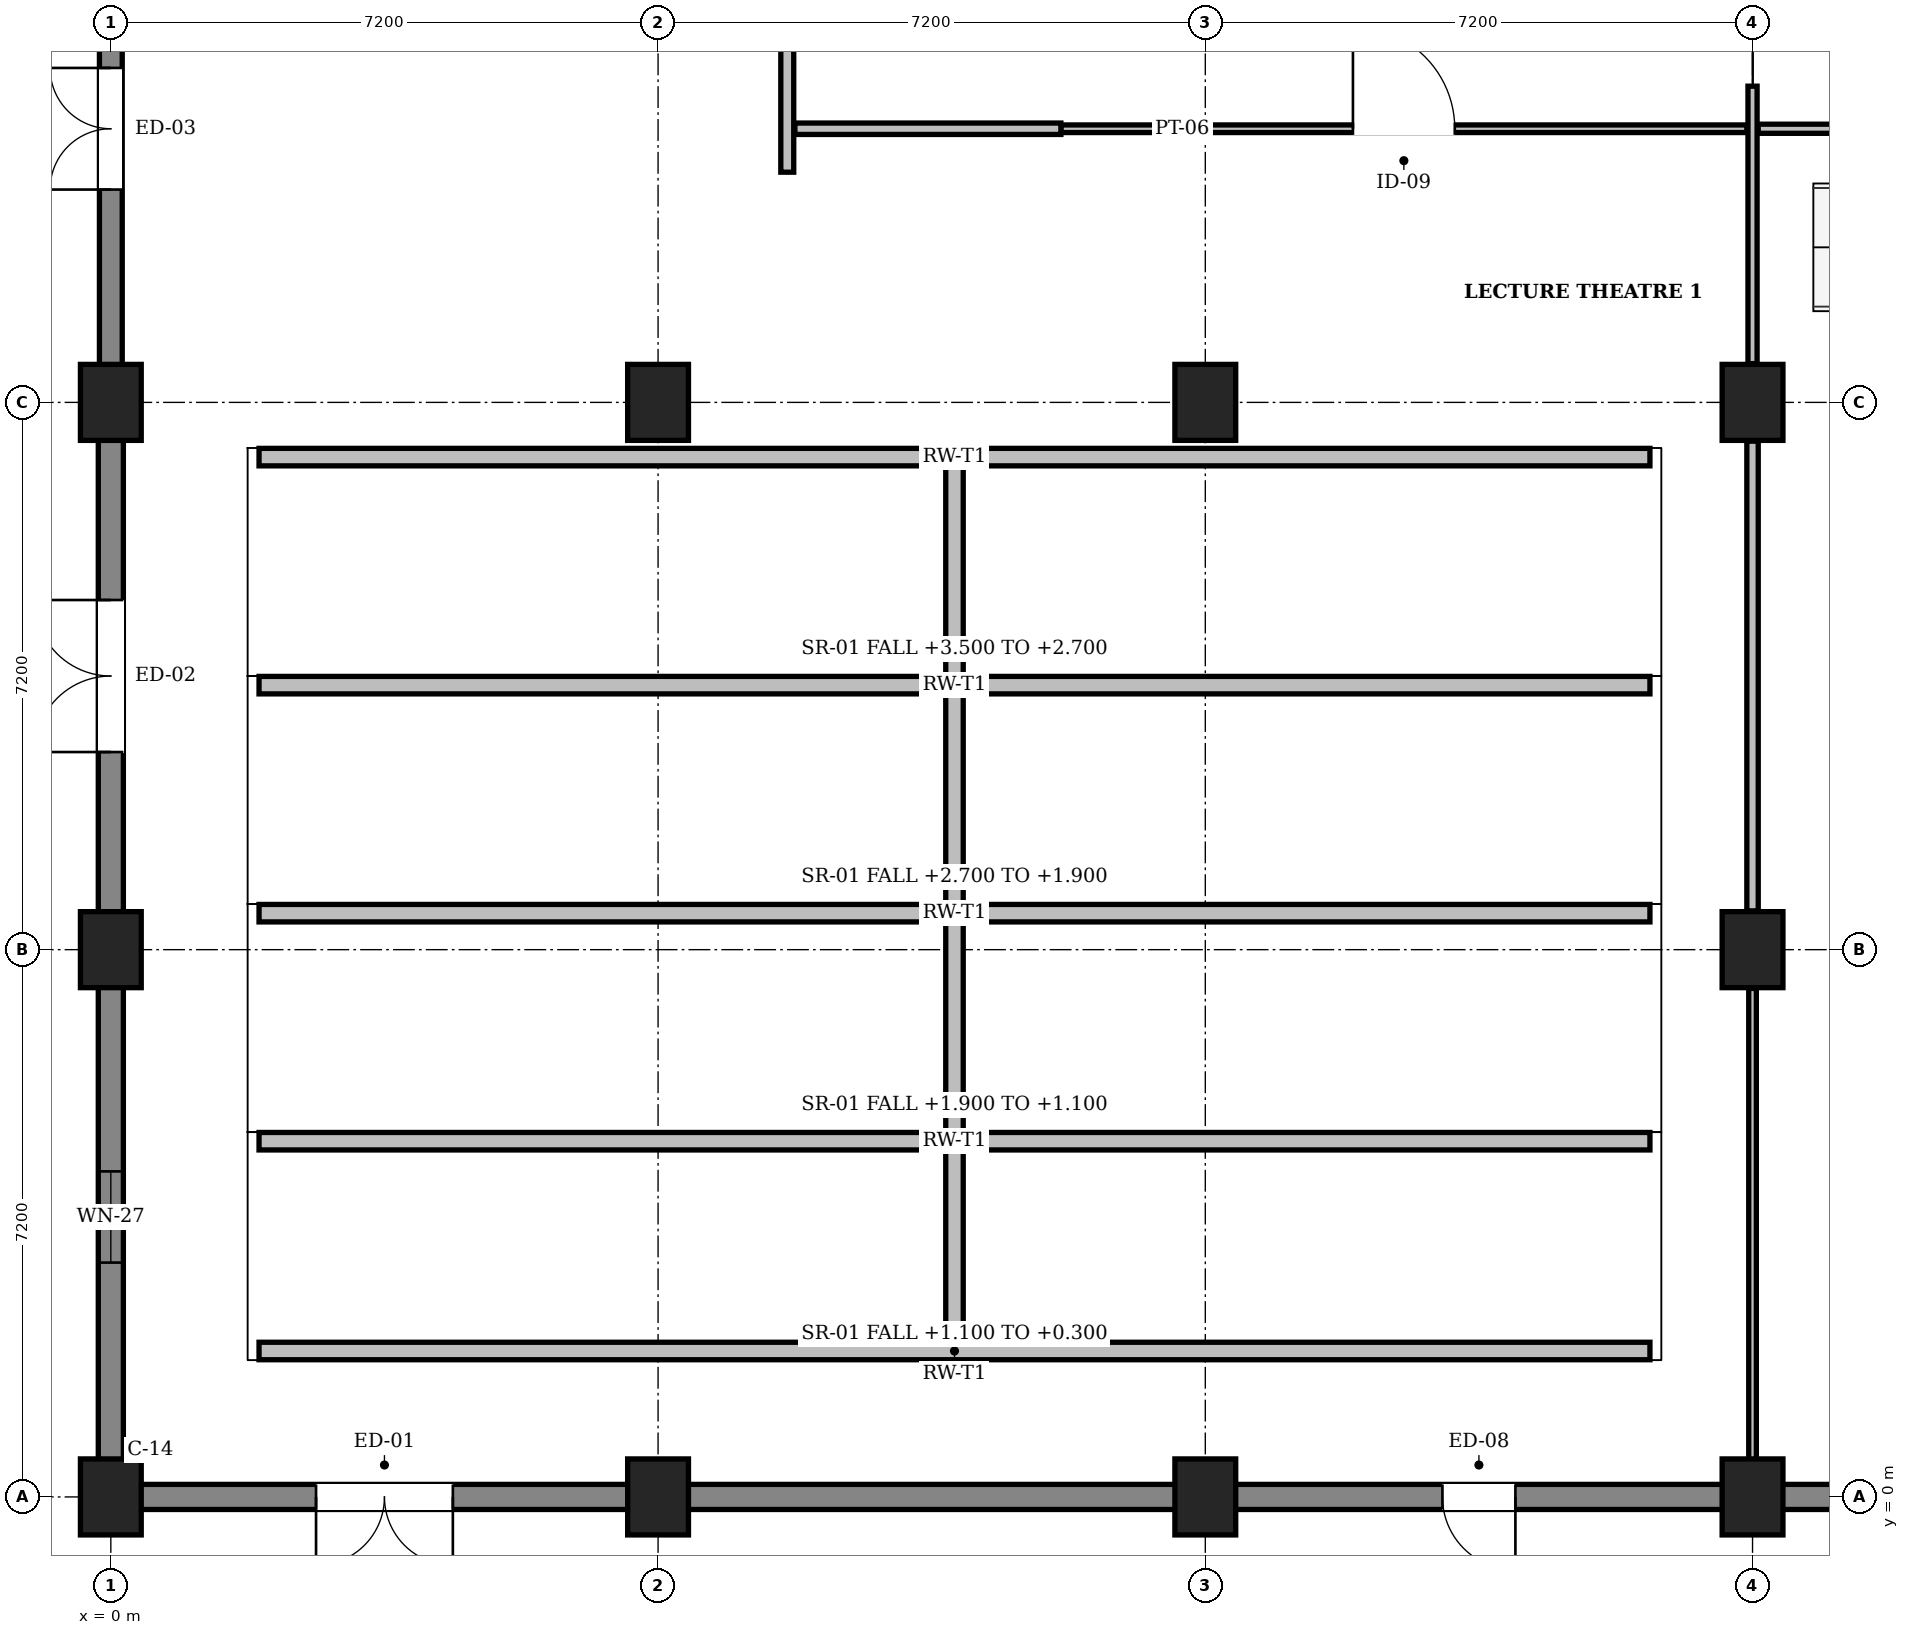
"""IFC4 building model, lengths in metres.
Left out: names, types, materials, properties, quantities, classifications, styles, units other than length and angle.
Written with IfcOpenShell. Run it as: python <this file> out.ifc"""

import sys

from ifc_helpers import new_model, si_unit, direction, frame, frame_2d, origin, origin_2d, place, context, subcontext, project, spatial, rectangle, extrude, element, fill, save


model = new_model("IFC4")
c1 = context("Model", 3, precision=1e-05, world=origin(), true_north=direction((0.0, 1.0)))
c2 = subcontext(c1, "Body", "Model", "MODEL_VIEW")
j1 = project(units=[si_unit("LENGTHUNIT", "METRE"), si_unit("PLANEANGLEUNIT", "RADIAN")], contexts=[c1])
p1 = place(None, origin())
s1 = spatial("IfcSite", under=j1, at=p1, CompositionType="ELEMENT")
p2 = place(p1, origin())
s2 = spatial("IfcBuilding", under=s1, at=p2, CompositionType="ELEMENT")
p3 = place(p2, origin())
s3 = spatial("IfcBuildingStorey", under=s2, at=p3, CompositionType="ELEMENT", Elevation=0.0)
for number, where, z_axis, x_axis in (
    (1, (0.0, 0.0, 0.0), (0.0, 0.0, 1.0), (1.0, 0.0, 0.0)),
    (2, (0.0, 7.2, 0.0), (0.0, 0.0, 1.0), (1.0, 0.0, 0.0)),
    (3, (0.0, 14.4, 0.0), (0.0, 0.0, 1.0), (1.0, 0.0, 0.0)),
    (4, (7.2, 0.0, 0.0), (0.0, 0.0, 1.0), (1.0, 0.0, 0.0)),
    (5, (7.2, 14.4, 0.0), (0.0, 0.0, 1.0), (1.0, 0.0, 0.0)),
    (6, (14.4, 0.0, 0.0), (0.0, 0.0, 1.0), (1.0, 0.0, 0.0)),
    (7, (14.4, 14.4, 0.0), (0.0, 0.0, 1.0), (1.0, 0.0, 0.0)),
    (8, (21.6, 0.0, 0.0), (0.0, 0.0, 1.0), (1.0, 0.0, 0.0)),
    (9, (21.6, 7.2, 0.0), (0.0, 0.0, 1.0), (1.0, 0.0, 0.0)),
    (10, (21.6, 14.4, 0.0), (0.0, 0.0, 1.0), (1.0, 0.0, 0.0)),
):
    element("IfcColumn", number, at=place(p3, frame(where, z_axis=z_axis, x_axis=x_axis)), inside=s3, PredefinedType="COLUMN", context=c2, shape_type="SweptSolid", body=[
        extrude(rectangle(XDim=0.8, YDim=1.0, at=origin_2d()), origin(), (0.0, 0.0, 1.0), 4.8),
    ])
p4 = place(p3, frame((1.95, 1.92, 0.0), z_axis=(0.0, 0.0, 1.0), x_axis=(1.0, 0.0, 0.0)))
e11 = element("IfcWall", 11, at=p4, inside=s3, PredefinedType="SOLIDWALL", context=c2, shape_type="SweptSolid", body=[
    extrude(rectangle(XDim=18.3, YDim=0.23, at=frame_2d((9.15, 0.0))), origin(), (0.0, 0.0, 1.0), 0.1),
])
p5 = place(p3, frame((1.95, 4.68, 0.0), z_axis=(0.0, 0.0, 1.0), x_axis=(1.0, 0.0, 0.0)))
e12 = element("IfcWall", 12, at=p5, inside=s3, PredefinedType="SOLIDWALL", context=c2, shape_type="SweptSolid", body=[
    extrude(rectangle(XDim=18.3, YDim=0.23, at=frame_2d((9.15, 0.0))), origin(), (0.0, 0.0, 1.0), 0.88),
])
p6 = place(p3, frame((11.1, 2.035, 0.0), z_axis=(0.0, 0.0, 1.0), x_axis=(0.0, 1.0, 0.0)))
e13 = element("IfcWall", 13, at=p6, inside=s3, PredefinedType="SOLIDWALL", context=c2, shape_type="SweptSolid", body=[
    extrude(rectangle(XDim=2.53, YDim=0.23, at=frame_2d((1.265, 0.0))), origin(), (0.0, 0.0, 1.0), 0.48),
])
p7 = place(p3, frame((1.95, 7.68, 0.0), z_axis=(0.0, 0.0, 1.0), x_axis=(1.0, 0.0, 0.0)))
e14 = element("IfcWall", 14, at=p7, inside=s3, PredefinedType="SOLIDWALL", context=c2, shape_type="SweptSolid", body=[
    extrude(rectangle(XDim=18.3, YDim=0.23, at=frame_2d((9.15, 0.0))), origin(), (0.0, 0.0, 1.0), 1.68),
])
p8 = place(p3, frame((11.1, 4.795, 0.0), z_axis=(0.0, 0.0, 1.0), x_axis=(0.0, 1.0, 0.0)))
e15 = element("IfcWall", 15, at=p8, inside=s3, PredefinedType="SOLIDWALL", context=c2, shape_type="SweptSolid", body=[
    extrude(rectangle(XDim=2.77, YDim=0.23, at=frame_2d((1.385, 0.0))), origin(), (0.0, 0.0, 1.0), 1.28),
])
p9 = place(p3, frame((1.95, 10.68, 0.0), z_axis=(0.0, 0.0, 1.0), x_axis=(1.0, 0.0, 0.0)))
e16 = element("IfcWall", 16, at=p9, inside=s3, PredefinedType="SOLIDWALL", context=c2, shape_type="SweptSolid", body=[
    extrude(rectangle(XDim=18.3, YDim=0.23, at=frame_2d((9.15, 0.0))), origin(), (0.0, 0.0, 1.0), 2.48),
])
p10 = place(p3, frame((11.1, 7.795, 0.0), z_axis=(0.0, 0.0, 1.0), x_axis=(0.0, 1.0, 0.0)))
e17 = element("IfcWall", 17, at=p10, inside=s3, PredefinedType="SOLIDWALL", context=c2, shape_type="SweptSolid", body=[
    extrude(rectangle(XDim=2.77, YDim=0.23, at=frame_2d((1.385, 0.0))), origin(), (0.0, 0.0, 1.0), 2.08),
])
p11 = place(p3, frame((1.95, 13.68, 0.0), z_axis=(0.0, 0.0, 1.0), x_axis=(1.0, 0.0, 0.0)))
e18 = element("IfcWall", 18, at=p11, inside=s3, PredefinedType="SOLIDWALL", context=c2, shape_type="SweptSolid", body=[
    extrude(rectangle(XDim=18.3, YDim=0.23, at=frame_2d((9.15, 0.0))), origin(), (0.0, 0.0, 1.0), 3.28),
])
p12 = place(p3, frame((11.1, 10.795, 0.0), z_axis=(0.0, 0.0, 1.0), x_axis=(0.0, 1.0, 0.0)))
e19 = element("IfcWall", 19, at=p12, inside=s3, PredefinedType="SOLIDWALL", context=c2, shape_type="SweptSolid", body=[
    extrude(rectangle(XDim=2.77, YDim=0.23, at=frame_2d((1.385, 0.0))), origin(), (0.0, 0.0, 1.0), 2.88),
])
p13 = place(p3, frame((28.8, 0.0, 0.0), z_axis=(0.0, 0.0, 1.0), x_axis=(-1.0, 0.0, 0.0)))
e20 = element("IfcWall", 20, at=p13, inside=s3, PredefinedType="SOLIDWALL", context=c2, shape_type="SweptSolid", body=[
    extrude(rectangle(XDim=7.2, YDim=0.33, at=frame_2d((3.6, 0.0))), origin(), (0.0, 0.0, 1.0), 4.52),
])
p14 = place(p3, frame((21.6, 0.0, 0.0), z_axis=(0.0, 0.0, 1.0), x_axis=(-1.0, 0.0, 0.0)))
e21 = element("IfcWall", 21, at=p14, inside=s3, PredefinedType="SOLIDWALL", context=c2, shape_type="SweptSolid", body=[
    extrude(rectangle(XDim=7.2, YDim=0.33, at=frame_2d((3.6, 0.0))), origin(), (0.0, 0.0, 1.0), 4.52),
])
p15 = place(p14, frame((3.12, 0.0, 0.0)))
e22 = element("IfcOpeningElement", 22, at=p15, cuts=e21, PredefinedType="OPENING", context=c2, shape_type="SweptSolid", body=[
    extrude(rectangle(XDim=0.96, YDim=2.1, at=frame_2d((0.48, 1.05))), frame((0.0, 0.177, 0.0), z_axis=(0.0, -1.0, 0.0), x_axis=(1.0, 0.0, 0.0)), (0.0, 0.0, 1.0), 0.354),
])
p16 = place(p3, frame((14.4, 0.0, 0.0), z_axis=(0.0, 0.0, 1.0), x_axis=(-1.0, 0.0, 0.0)))
e23 = element("IfcWall", 23, at=p16, inside=s3, PredefinedType="SOLIDWALL", context=c2, shape_type="SweptSolid", body=[
    extrude(rectangle(XDim=7.2, YDim=0.33, at=frame_2d((3.6, 0.0))), origin(), (0.0, 0.0, 1.0), 4.52),
])
p17 = place(p3, frame((7.2, 0.0, 0.0), z_axis=(0.0, 0.0, 1.0), x_axis=(-1.0, 0.0, 0.0)))
e24 = element("IfcWall", 24, at=p17, inside=s3, PredefinedType="SOLIDWALL", context=c2, shape_type="SweptSolid", body=[
    extrude(rectangle(XDim=7.35, YDim=0.33, at=frame_2d((3.675, 0.0))), origin(), (0.0, 0.0, 1.0), 4.52),
])
p18 = place(p17, frame((2.7, 0.0, 0.0)))
e25 = element("IfcOpeningElement", 25, at=p18, cuts=e24, PredefinedType="OPENING", context=c2, shape_type="SweptSolid", body=[
    extrude(rectangle(XDim=1.8, YDim=2.2, at=frame_2d((0.9, 1.1))), frame((0.0, 0.177, 0.0), z_axis=(0.0, -1.0, 0.0), x_axis=(1.0, 0.0, 0.0)), (0.0, 0.0, 1.0), 0.354),
])
p19 = place(p3, frame((0.0, 0.166, 0.0), z_axis=(0.0, 0.0, 1.0), x_axis=(0.0, 1.0, 0.0)))
e26 = element("IfcWall", 26, at=p19, inside=s3, PredefinedType="SOLIDWALL", context=c2, shape_type="SweptSolid", body=[
    extrude(rectangle(XDim=7.034, YDim=0.33, at=frame_2d((3.517, 0.0))), origin(), (0.0, 0.0, 1.0), 4.52),
])
p20 = place(p19, frame((2.917, 0.0, 0.95)))
e27 = element("IfcOpeningElement", 27, at=p20, cuts=e26, PredefinedType="OPENING", context=c2, shape_type="SweptSolid", body=[
    extrude(rectangle(XDim=1.2, YDim=1.8, at=frame_2d((0.6, 0.9))), frame((0.0, 0.177, 0.0), z_axis=(0.0, -1.0, 0.0), x_axis=(1.0, 0.0, 0.0)), (0.0, 0.0, 1.0), 0.354),
])
p21 = place(p3, frame((0.0, 7.2, 0.0), z_axis=(0.0, 0.0, 1.0), x_axis=(0.0, 1.0, 0.0)))
e28 = element("IfcWall", 28, at=p21, inside=s3, PredefinedType="SOLIDWALL", context=c2, shape_type="SweptSolid", body=[
    extrude(rectangle(XDim=7.2, YDim=0.33, at=frame_2d((3.6, 0.0))), origin(), (0.0, 0.0, 1.0), 4.52),
])
p22 = place(p21, frame((2.6, 0.0, 0.0)))
e29 = element("IfcOpeningElement", 29, at=p22, cuts=e28, PredefinedType="OPENING", context=c2, shape_type="SweptSolid", body=[
    extrude(rectangle(XDim=2.0, YDim=2.3, at=frame_2d((1.0, 1.15))), frame((0.0, 0.177, 0.0), z_axis=(0.0, -1.0, 0.0), x_axis=(1.0, 0.0, 0.0)), (0.0, 0.0, 1.0), 0.354),
])
p23 = place(p3, frame((0.0, 14.4, 0.0), z_axis=(0.0, 0.0, 1.0), x_axis=(0.0, 1.0, 0.0)))
e30 = element("IfcWall", 30, at=p23, inside=s3, PredefinedType="SOLIDWALL", context=c2, shape_type="SweptSolid", body=[
    extrude(rectangle(XDim=7.2, YDim=0.3, at=frame_2d((3.6, 0.0))), origin(), (0.0, 0.0, 1.0), 4.52),
])
p24 = place(p23, frame((2.8, 0.0, 0.0)))
e31 = element("IfcOpeningElement", 31, at=p24, cuts=e30, PredefinedType="OPENING", context=c2, shape_type="SweptSolid", body=[
    extrude(rectangle(XDim=1.6, YDim=2.2, at=frame_2d((0.8, 1.1))), frame((0.0, 0.162, 0.0), z_axis=(0.0, -1.0, 0.0), x_axis=(1.0, 0.0, 0.0)), (0.0, 0.0, 1.0), 0.324),
])
p25 = place(p3, frame((8.9, 17.428, 0.0), z_axis=(0.0, 0.0, 1.0), x_axis=(0.0, 1.0, 0.0)))
e32 = element("IfcWall", 32, at=p25, inside=s3, PredefinedType="PARTITIONING", context=c2, shape_type="SweptSolid", body=[
    extrude(rectangle(XDim=2.072, YDim=0.17, at=frame_2d((1.036, 0.0))), origin(), (0.0, 0.0, 1.0), 4.46),
])
p26 = place(p3, frame((21.6, 0.177, 0.0), z_axis=(0.0, 0.0, 1.0), x_axis=(0.0, 1.0, 0.0)))
e33 = element("IfcWall", 33, at=p26, inside=s3, PredefinedType="PARTITIONING", context=c2, shape_type="SweptSolid", body=[
    extrude(rectangle(XDim=6.513, YDim=0.1, at=frame_2d((3.256, 0.0))), origin(), (0.0, 0.0, 1.0), 4.08),
])
p27 = place(p3, frame((21.6, 7.71, 0.0), z_axis=(0.0, 0.0, 1.0), x_axis=(0.0, 1.0, 0.0)))
e34 = element("IfcWall", 34, at=p27, inside=s3, PredefinedType="PARTITIONING", context=c2, shape_type="SweptSolid", body=[
    extrude(rectangle(XDim=6.18, YDim=0.15, at=frame_2d((3.09, 0.0))), origin(), (0.0, 0.0, 1.0), 4.08),
])
p28 = place(p3, frame((21.6, 14.91, 0.0), z_axis=(0.0, 0.0, 1.0), x_axis=(0.0, 1.0, 0.0)))
e35 = element("IfcWall", 35, at=p28, inside=s3, PredefinedType="PARTITIONING", context=c2, shape_type="SweptSolid", body=[
    extrude(rectangle(XDim=3.65, YDim=0.12, at=frame_2d((1.825, 0.0))), origin(), (0.0, 0.0, 1.0), 4.08),
])
p29 = place(p3, frame((12.5, 18.0, 0.0), z_axis=(0.0, 0.0, 1.0), x_axis=(1.0, 0.0, 0.0)))
e36 = element("IfcWall", 36, at=p29, inside=s3, PredefinedType="PARTITIONING", context=c2, shape_type="SweptSolid", body=[
    extrude(rectangle(XDim=9.025, YDim=0.1, at=frame_2d((4.512, 0.0))), origin(), (0.0, 0.0, 1.0), 4.46),
])
p30 = place(p29, frame((3.843, 0.0, 0.0)))
e37 = element("IfcOpeningElement", 37, at=p30, cuts=e36, PredefinedType="OPENING", context=c2, shape_type="SweptSolid", body=[
    extrude(rectangle(XDim=1.34, YDim=2.24, at=frame_2d((0.67, 1.12))), frame((0.0, 0.062, 0.0), z_axis=(0.0, -1.0, 0.0), x_axis=(1.0, 0.0, 0.0)), (0.0, 0.0, 1.0), 0.124),
])
p31 = place(p3, frame((9.0, 18.0, 0.0), z_axis=(0.0, 0.0, 1.0), x_axis=(1.0, 0.0, 0.0)))
e38 = element("IfcWall", 38, at=p31, inside=s3, PredefinedType="PARTITIONING", context=c2, shape_type="SweptSolid", body=[
    extrude(rectangle(XDim=3.5, YDim=0.15, at=frame_2d((1.75, 0.0))), origin(), (0.0, 0.0, 1.0), 4.46),
])
p32 = place(p3, frame((21.675, 18.0, 0.0), z_axis=(0.0, 0.0, 1.0), x_axis=(1.0, 0.0, 0.0)))
e39 = element("IfcWall", 39, at=p32, inside=s3, PredefinedType="PARTITIONING", context=c2, shape_type="SweptSolid", body=[
    extrude(rectangle(XDim=22.085, YDim=0.12, at=frame_2d((11.042, 0.0))), origin(), (0.0, 0.0, 1.0), 4.46),
])
p33 = place(p15, origin())
e40 = element("IfcDoor", 40, at=p33, inside=s3, OperationType="SINGLE_SWING_LEFT", PredefinedType="DOOR", context=c2, shape_type="SweptSolid", body=[
    extrude(rectangle(XDim=0.96, YDim=2.1, at=frame_2d((0.48, 1.05))), frame((0.0, 0.025, 0.0), z_axis=(0.0, -1.0, 0.0), x_axis=(1.0, 0.0, 0.0)), (0.0, 0.0, 1.0), 0.05),
])
fill(e22, e40)
p34 = place(p18, origin())
e41 = element("IfcDoor", 41, at=p34, inside=s3, OperationType="DOUBLE_DOOR_SINGLE_SWING", PredefinedType="DOOR", context=c2, shape_type="SweptSolid", body=[
    extrude(rectangle(XDim=1.8, YDim=2.2, at=frame_2d((0.9, 1.1))), frame((0.0, 0.025, 0.0), z_axis=(0.0, -1.0, 0.0), x_axis=(1.0, 0.0, 0.0)), (0.0, 0.0, 1.0), 0.05),
])
fill(e25, e41)
p35 = place(p20, origin())
e42 = element("IfcWindow", 42, at=p35, inside=s3, PartitioningType="SINGLE_PANEL", PredefinedType="WINDOW", context=c2, shape_type="SweptSolid", body=[
    extrude(rectangle(XDim=1.2, YDim=1.8, at=frame_2d((0.6, 0.9))), frame((0.0, 0.03, 0.0), z_axis=(0.0, -1.0, 0.0), x_axis=(1.0, 0.0, 0.0)), (0.0, 0.0, 1.0), 0.06),
])
fill(e27, e42)
p36 = place(p22, origin())
e43 = element("IfcDoor", 43, at=p36, inside=s3, OperationType="DOUBLE_DOOR_SINGLE_SWING", PredefinedType="DOOR", context=c2, shape_type="SweptSolid", body=[
    extrude(rectangle(XDim=2.0, YDim=2.3, at=frame_2d((1.0, 1.15))), frame((0.0, 0.025, 0.0), z_axis=(0.0, -1.0, 0.0), x_axis=(1.0, 0.0, 0.0)), (0.0, 0.0, 1.0), 0.05),
])
fill(e29, e43)
p37 = place(p24, origin())
e44 = element("IfcDoor", 44, at=p37, inside=s3, OperationType="DOUBLE_DOOR_SINGLE_SWING", PredefinedType="DOOR", context=c2, shape_type="SweptSolid", body=[
    extrude(rectangle(XDim=1.6, YDim=2.2, at=frame_2d((0.8, 1.1))), frame((0.0, 0.025, 0.0), z_axis=(0.0, -1.0, 0.0), x_axis=(1.0, 0.0, 0.0)), (0.0, 0.0, 1.0), 0.05),
])
fill(e31, e44)
p38 = place(p30, origin())
e45 = element("IfcDoor", 45, at=p38, inside=s3, OperationType="SINGLE_SWING_LEFT", PredefinedType="DOOR", context=c2, shape_type="SweptSolid", body=[
    extrude(rectangle(XDim=1.34, YDim=2.24, at=frame_2d((0.67, 1.12))), frame((0.0, 0.025, 0.0), z_axis=(0.0, -1.0, 0.0), x_axis=(1.0, 0.0, 0.0)), (0.0, 0.0, 1.0), 0.05),
])
fill(e37, e45)
save(model, sys.argv[1])
